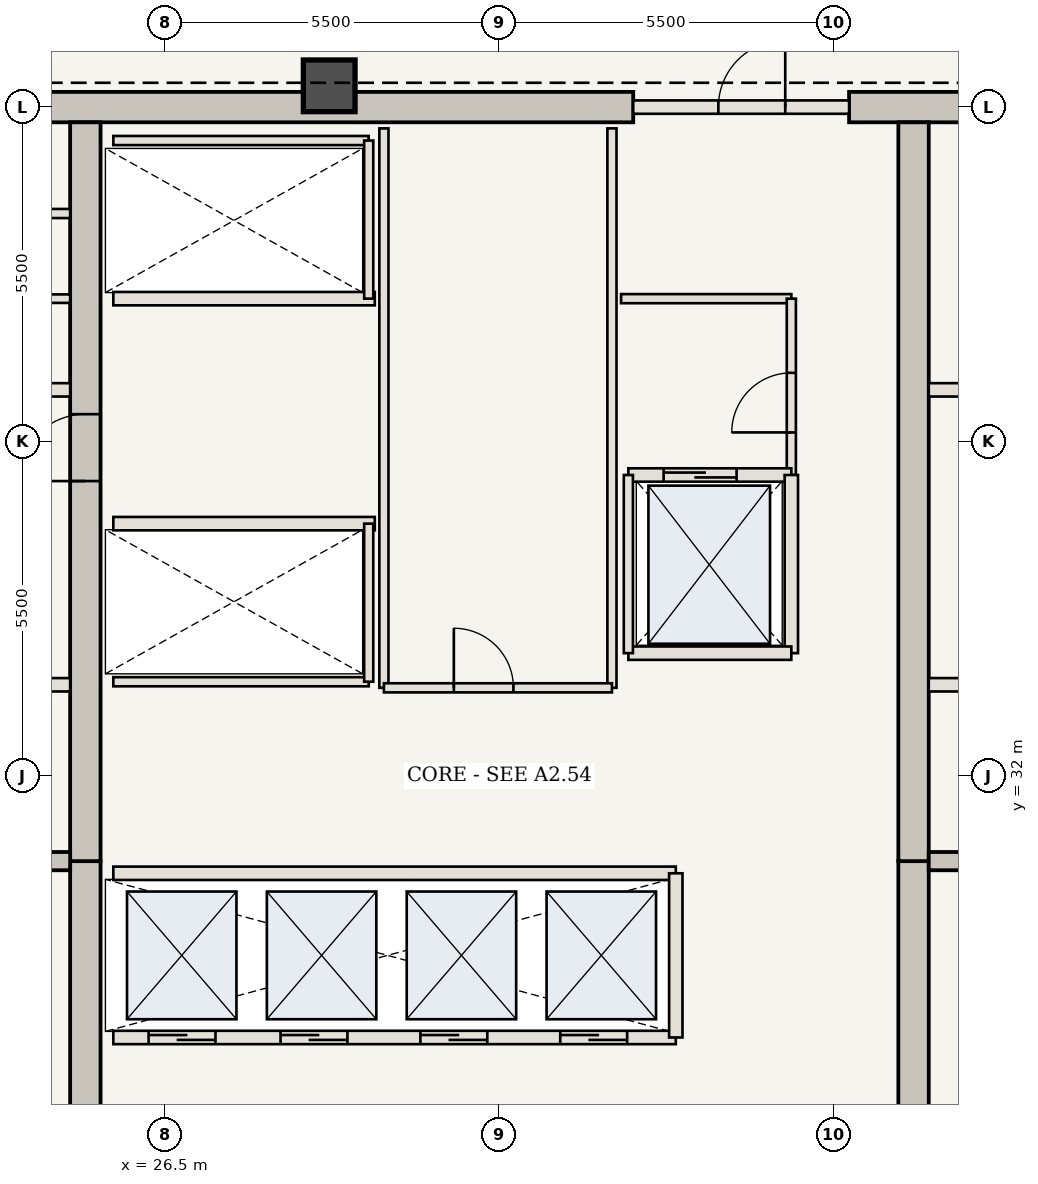
"""IFC4 building model, lengths in metres.
Left out: names, types, materials, properties, quantities, classifications, styles, units other than length and angle.
Written with IfcOpenShell. Run it as: python <this file> out.ifc"""

import sys

from ifc_helpers import new_model, si_unit, direction, frame, frame_2d, origin, origin_2d, place, context, subcontext, project, spatial, rectangle, extrude, element, fill, save


model = new_model("IFC4")
c1 = context("Model", 3, precision=1e-05, world=origin(), true_north=direction((0.0, 1.0)))
c2 = subcontext(c1, "Body", "Model", "MODEL_VIEW")
j1 = project(units=[si_unit("LENGTHUNIT", "METRE"), si_unit("PLANEANGLEUNIT", "RADIAN")], contexts=[c1])
p1 = place(None, origin())
s1 = spatial("IfcSite", under=j1, at=p1, CompositionType="ELEMENT")
p2 = place(p1, origin())
s2 = spatial("IfcBuilding", under=s1, at=p2, CompositionType="ELEMENT")
p3 = place(p2, frame((0.0, 0.0, 244.65)))
s3 = spatial("IfcBuildingStorey", under=s2, at=p3, CompositionType="ELEMENT", Elevation=244.65)
p4 = place(p3, frame((21.41, 43.0, 0.0), z_axis=(0.0, 0.0, 1.0), x_axis=(1.0, 0.0, 0.0)))
e1 = element("IfcWall", 1, at=p4, inside=s3, PredefinedType="SHEAR", context=c2, shape_type="SweptSolid", body=[
    extrude(rectangle(XDim=12.79, YDim=0.5, at=frame_2d((6.395, 0.0))), origin(), (0.0, 0.0, 1.0), 3.85),
])
p5 = place(p3, frame((37.75, 43.0, 0.0), z_axis=(0.0, 0.0, 1.0), x_axis=(1.0, 0.0, 0.0)))
e2 = element("IfcWall", 2, at=p5, inside=s3, PredefinedType="SHEAR", context=c2, shape_type="SweptSolid", body=[
    extrude(rectangle(XDim=4.84, YDim=0.5, at=frame_2d((2.42, 0.0))), origin(), (0.0, 0.0, 1.0), 3.85),
])
p6 = place(p3, frame((25.19, 21.2, 0.0), z_axis=(0.0, 0.0, 1.0), x_axis=(0.0, 1.0, 0.0)))
e3 = element("IfcWall", 3, at=p6, inside=s3, PredefinedType="SHEAR", context=c2, shape_type="SweptSolid", body=[
    extrude(rectangle(XDim=9.4, YDim=0.5, at=frame_2d((4.7, 0.0))), origin(), (0.0, 0.0, 1.0), 3.85),
])
p7 = place(p3, frame((25.19, 30.6, 0.0), z_axis=(0.0, 0.0, 1.0), x_axis=(0.0, 1.0, 0.0)))
e4 = element("IfcWall", 4, at=p7, inside=s3, PredefinedType="SHEAR", context=c2, shape_type="SweptSolid", body=[
    extrude(rectangle(XDim=12.15, YDim=0.5, at=frame_2d((6.075, 0.0))), origin(), (0.0, 0.0, 1.0), 3.85),
])
p8 = place(p7, frame((6.25, 0.0, 0.0)))
e5 = element("IfcOpeningElement", 5, at=p8, cuts=e4, PredefinedType="OPENING", context=c2, shape_type="SweptSolid", body=[
    extrude(rectangle(XDim=1.1, YDim=2.15, at=frame_2d((0.55, 1.075))), frame((0.0, 0.26, 0.0), z_axis=(0.0, -1.0, 0.0), x_axis=(1.0, 0.0, 0.0)), (0.0, 0.0, 1.0), 0.52),
])
p9 = place(p3, frame((38.81, 21.2, 0.0), z_axis=(0.0, 0.0, 1.0), x_axis=(0.0, 1.0, 0.0)))
e6 = element("IfcWall", 6, at=p9, inside=s3, PredefinedType="SHEAR", context=c2, shape_type="SweptSolid", body=[
    extrude(rectangle(XDim=9.4, YDim=0.5, at=frame_2d((4.7, 0.0))), origin(), (0.0, 0.0, 1.0), 3.85),
])
p10 = place(p3, frame((38.81, 30.6, 0.0), z_axis=(0.0, 0.0, 1.0), x_axis=(0.0, 1.0, 0.0)))
e7 = element("IfcWall", 7, at=p10, inside=s3, PredefinedType="SHEAR", context=c2, shape_type="SweptSolid", body=[
    extrude(rectangle(XDim=12.15, YDim=0.5, at=frame_2d((6.075, 0.0))), origin(), (0.0, 0.0, 1.0), 3.85),
])
p11 = place(p3, frame((29.2, 43.35, 0.0), z_axis=(0.0, 0.0, 1.0), x_axis=(1.0, 0.0, 0.0)))
e8 = element("IfcColumn", 8, at=p11, inside=s3, PredefinedType="COLUMN", context=c2, shape_type="SweptSolid", body=[
    extrude(rectangle(XDim=0.85, YDim=0.85, at=origin_2d()), origin(), (0.0, 0.0, 1.0), 3.85),
])
for number, where, z_axis, x_axis in (
    (9, (21.41, 30.6, 0.0), (0.0, 0.0, 1.0), (1.0, 0.0, 0.0)),
    (10, (39.06, 30.6, 0.0), (0.0, 0.0, 1.0), (1.0, 0.0, 0.0)),
):
    element("IfcWall", number, at=place(p3, frame(where, z_axis=z_axis, x_axis=x_axis)), inside=s3, PredefinedType="SHEAR", context=c2, shape_type="SweptSolid", body=[
        extrude(rectangle(XDim=3.53, YDim=0.3, at=frame_2d((1.765, 0.0))), origin(), (0.0, 0.0, 1.0), 3.685),
    ])
p12 = place(p3, frame((21.41, 33.5, 0.0), z_axis=(0.0, 0.0, 1.0), x_axis=(1.0, 0.0, 0.0)))
e11 = element("IfcWall", 11, at=p12, inside=s3, PredefinedType="STANDARD", context=c2, shape_type="SweptSolid", body=[
    extrude(rectangle(XDim=3.53, YDim=0.22, at=frame_2d((1.765, 0.0))), origin(), (0.0, 0.0, 1.0), 3.685),
])
p13 = place(p12, frame((0.75, 0.0, 0.0)))
e12 = element("IfcOpeningElement", 12, at=p13, cuts=e11, PredefinedType="OPENING", context=c2, shape_type="SweptSolid", body=[
    extrude(rectangle(XDim=1.2, YDim=2.2, at=frame_2d((0.6, 1.1))), frame((0.0, 0.12, 0.0), z_axis=(0.0, -1.0, 0.0), x_axis=(1.0, 0.0, 0.0)), (0.0, 0.0, 1.0), 0.24),
])
p14 = place(p3, frame((39.06, 33.5, 0.0), z_axis=(0.0, 0.0, 1.0), x_axis=(1.0, 0.0, 0.0)))
e13 = element("IfcWall", 13, at=p14, inside=s3, PredefinedType="STANDARD", context=c2, shape_type="SweptSolid", body=[
    extrude(rectangle(XDim=3.53, YDim=0.22, at=frame_2d((1.765, 0.0))), origin(), (0.0, 0.0, 1.0), 3.685),
])
p15 = place(p14, frame((1.55, 0.0, 0.0)))
e14 = element("IfcOpeningElement", 14, at=p15, cuts=e13, PredefinedType="OPENING", context=c2, shape_type="SweptSolid", body=[
    extrude(rectangle(XDim=1.2, YDim=2.2, at=frame_2d((0.6, 1.1))), frame((0.0, 0.12, 0.0), z_axis=(0.0, -1.0, 0.0), x_axis=(1.0, 0.0, 0.0)), (0.0, 0.0, 1.0), 0.24),
])
for number, where, z_axis, x_axis in (
    (15, (21.41, 38.35, 0.0), (0.0, 0.0, 1.0), (1.0, 0.0, 0.0)),
    (16, (39.06, 38.35, 0.0), (0.0, 0.0, 1.0), (1.0, 0.0, 0.0)),
):
    element("IfcWall", number, at=place(p3, frame(where, z_axis=z_axis, x_axis=x_axis)), inside=s3, PredefinedType="STANDARD", context=c2, shape_type="SweptSolid", body=[
        extrude(rectangle(XDim=3.53, YDim=0.22, at=frame_2d((1.765, 0.0))), origin(), (0.0, 0.0, 1.0), 3.685),
    ])
p16 = place(p3, frame((21.41, 39.85, 0.0), z_axis=(0.0, 0.0, 1.0), x_axis=(1.0, 0.0, 0.0)))
e17 = element("IfcWall", 17, at=p16, inside=s3, PredefinedType="STANDARD", context=c2, shape_type="SweptSolid", body=[
    extrude(rectangle(XDim=3.53, YDim=0.14, at=frame_2d((1.765, 0.0))), origin(), (0.0, 0.0, 1.0), 3.685),
])
p17 = place(p3, frame((21.41, 41.25, 0.0), z_axis=(0.0, 0.0, 1.0), x_axis=(1.0, 0.0, 0.0)))
e18 = element("IfcWall", 18, at=p17, inside=s3, PredefinedType="STANDARD", context=c2, shape_type="SweptSolid", body=[
    extrude(rectangle(XDim=3.53, YDim=0.15, at=frame_2d((1.765, 0.0))), origin(), (0.0, 0.0, 1.0), 3.685),
])
p18 = place(p3, frame((34.0, 39.85, 0.0), z_axis=(0.0, 0.0, 1.0), x_axis=(1.0, 0.0, 0.0)))
e19 = element("IfcWall", 19, at=p18, inside=s3, PredefinedType="STANDARD", context=c2, shape_type="SweptSolid", body=[
    extrude(rectangle(XDim=2.8, YDim=0.15, at=frame_2d((1.4, 0.0))), origin(), (0.0, 0.0, 1.0), 3.685),
])
p19 = place(p3, frame((36.8, 36.95, 0.0), z_axis=(0.0, 0.0, 1.0), x_axis=(0.0, 1.0, 0.0)))
e20 = element("IfcWall", 20, at=p19, inside=s3, PredefinedType="STANDARD", context=c2, shape_type="SweptSolid", body=[
    extrude(rectangle(XDim=2.9, YDim=0.15, at=frame_2d((1.45, 0.0))), origin(), (0.0, 0.0, 1.0), 3.685),
])
p20 = place(p19, frame((0.7, 0.0, 0.0)))
e21 = element("IfcOpeningElement", 21, at=p20, cuts=e20, PredefinedType="OPENING", context=c2, shape_type="SweptSolid", body=[
    extrude(rectangle(XDim=0.98, YDim=2.2, at=frame_2d((0.49, 1.1))), frame((0.0, 0.085, 0.0), z_axis=(0.0, -1.0, 0.0), x_axis=(1.0, 0.0, 0.0)), (0.0, 0.0, 1.0), 0.17),
])
p21 = place(p3, frame((25.65, 27.7, 0.0), z_axis=(0.0, 0.0, 1.0), x_axis=(1.0, 0.0, 0.0)))
e22 = element("IfcWall", 22, at=p21, inside=s3, PredefinedType="STANDARD", context=c2, shape_type="SweptSolid", body=[
    extrude(rectangle(XDim=9.25, YDim=0.22, at=frame_2d((4.625, 0.0))), origin(), (0.0, 0.0, 1.0), 3.685),
])
p22 = place(p21, frame((0.58, 0.0, 0.0)))
e23 = element("IfcOpeningElement", 23, at=p22, cuts=e22, PredefinedType="OPENING", context=c2, shape_type="SweptSolid", body=[
    extrude(rectangle(XDim=1.1, YDim=2.15, at=frame_2d((0.55, 1.075))), frame((0.0, 0.12, 0.0), z_axis=(0.0, -1.0, 0.0), x_axis=(1.0, 0.0, 0.0)), (0.0, 0.0, 1.0), 0.24),
])
p23 = place(p21, frame((2.75, 0.0, 0.0)))
e24 = element("IfcOpeningElement", 24, at=p23, cuts=e22, PredefinedType="OPENING", context=c2, shape_type="SweptSolid", body=[
    extrude(rectangle(XDim=1.1, YDim=2.15, at=frame_2d((0.55, 1.075))), frame((0.0, 0.12, 0.0), z_axis=(0.0, -1.0, 0.0), x_axis=(1.0, 0.0, 0.0)), (0.0, 0.0, 1.0), 0.24),
])
p24 = place(p21, frame((5.05, 0.0, 0.0)))
e25 = element("IfcOpeningElement", 25, at=p24, cuts=e22, PredefinedType="OPENING", context=c2, shape_type="SweptSolid", body=[
    extrude(rectangle(XDim=1.1, YDim=2.15, at=frame_2d((0.55, 1.075))), frame((0.0, 0.12, 0.0), z_axis=(0.0, -1.0, 0.0), x_axis=(1.0, 0.0, 0.0)), (0.0, 0.0, 1.0), 0.24),
])
p25 = place(p21, frame((7.35, 0.0, 0.0)))
e26 = element("IfcOpeningElement", 26, at=p25, cuts=e22, PredefinedType="OPENING", context=c2, shape_type="SweptSolid", body=[
    extrude(rectangle(XDim=1.1, YDim=2.15, at=frame_2d((0.55, 1.075))), frame((0.0, 0.12, 0.0), z_axis=(0.0, -1.0, 0.0), x_axis=(1.0, 0.0, 0.0)), (0.0, 0.0, 1.0), 0.24),
])
p26 = place(p3, frame((25.65, 30.4, 0.0), z_axis=(0.0, 0.0, 1.0), x_axis=(1.0, 0.0, 0.0)))
e27 = element("IfcWall", 27, at=p26, inside=s3, PredefinedType="STANDARD", context=c2, shape_type="SweptSolid", body=[
    extrude(rectangle(XDim=9.25, YDim=0.22, at=frame_2d((4.625, 0.0))), origin(), (0.0, 0.0, 1.0), 3.685),
])
p27 = place(p3, frame((34.9, 27.7, 0.0), z_axis=(0.0, 0.0, 1.0), x_axis=(0.0, 1.0, 0.0)))
e28 = element("IfcWall", 28, at=p27, inside=s3, PredefinedType="STANDARD", context=c2, shape_type="SweptSolid", body=[
    extrude(rectangle(XDim=2.7, YDim=0.22, at=frame_2d((1.35, 0.0))), origin(), (0.0, 0.0, 1.0), 3.685),
])
p28 = place(p3, frame((25.65, 36.15, 0.0), z_axis=(0.0, 0.0, 1.0), x_axis=(1.0, 0.0, 0.0)))
e29 = element("IfcWall", 29, at=p28, inside=s3, PredefinedType="STANDARD", context=c2, shape_type="SweptSolid", body=[
    extrude(rectangle(XDim=4.3, YDim=0.22, at=frame_2d((2.15, 0.0))), origin(), (0.0, 0.0, 1.0), 3.685),
])
p29 = place(p3, frame((25.65, 33.55, 0.0), z_axis=(0.0, 0.0, 1.0), x_axis=(1.0, 0.0, 0.0)))
e30 = element("IfcWall", 30, at=p29, inside=s3, PredefinedType="STANDARD", context=c2, shape_type="SweptSolid", body=[
    extrude(rectangle(XDim=4.2, YDim=0.15, at=frame_2d((2.1, 0.0))), origin(), (0.0, 0.0, 1.0), 3.685),
])
p30 = place(p3, frame((29.85, 33.55, 0.0), z_axis=(0.0, 0.0, 1.0), x_axis=(0.0, 1.0, 0.0)))
e31 = element("IfcWall", 31, at=p30, inside=s3, PredefinedType="STANDARD", context=c2, shape_type="SweptSolid", body=[
    extrude(rectangle(XDim=2.6, YDim=0.15, at=frame_2d((1.3, 0.0))), origin(), (0.0, 0.0, 1.0), 3.685),
])
p31 = place(p3, frame((25.65, 39.85, 0.0), z_axis=(0.0, 0.0, 1.0), x_axis=(1.0, 0.0, 0.0)))
e32 = element("IfcWall", 32, at=p31, inside=s3, PredefinedType="STANDARD", context=c2, shape_type="SweptSolid", body=[
    extrude(rectangle(XDim=4.3, YDim=0.22, at=frame_2d((2.15, 0.0))), origin(), (0.0, 0.0, 1.0), 3.685),
])
p32 = place(p3, frame((25.65, 42.45, 0.0), z_axis=(0.0, 0.0, 1.0), x_axis=(1.0, 0.0, 0.0)))
e33 = element("IfcWall", 33, at=p32, inside=s3, PredefinedType="STANDARD", context=c2, shape_type="SweptSolid", body=[
    extrude(rectangle(XDim=4.2, YDim=0.15, at=frame_2d((2.1, 0.0))), origin(), (0.0, 0.0, 1.0), 3.685),
])
p33 = place(p3, frame((29.85, 39.85, 0.0), z_axis=(0.0, 0.0, 1.0), x_axis=(0.0, 1.0, 0.0)))
e34 = element("IfcWall", 34, at=p33, inside=s3, PredefinedType="STANDARD", context=c2, shape_type="SweptSolid", body=[
    extrude(rectangle(XDim=2.6, YDim=0.15, at=frame_2d((1.3, 0.0))), origin(), (0.0, 0.0, 1.0), 3.685),
])
for number, where, z_axis, x_axis in (
    (35, (30.1, 33.45, 0.0), (0.0, 0.0, 1.0), (0.0, 1.0, 0.0)),
    (36, (33.85, 33.45, 0.0), (0.0, 0.0, 1.0), (0.0, 1.0, 0.0)),
):
    element("IfcWall", number, at=place(p3, frame(where, z_axis=z_axis, x_axis=x_axis)), inside=s3, PredefinedType="STANDARD", context=c2, shape_type="SweptSolid", body=[
        extrude(rectangle(XDim=9.2, YDim=0.15, at=frame_2d((4.6, 0.0))), origin(), (0.0, 0.0, 1.0), 3.685),
    ])
p34 = place(p3, frame((30.1, 33.45, 0.0), z_axis=(0.0, 0.0, 1.0), x_axis=(1.0, 0.0, 0.0)))
e37 = element("IfcWall", 37, at=p34, inside=s3, PredefinedType="STANDARD", context=c2, shape_type="SweptSolid", body=[
    extrude(rectangle(XDim=3.75, YDim=0.15, at=frame_2d((1.875, 0.0))), origin(), (0.0, 0.0, 1.0), 3.685),
])
p35 = place(p34, frame((1.15, 0.0, 0.0)))
e38 = element("IfcOpeningElement", 38, at=p35, cuts=e37, PredefinedType="OPENING", context=c2, shape_type="SweptSolid", body=[
    extrude(rectangle(XDim=0.98, YDim=2.2, at=frame_2d((0.49, 1.1))), frame((0.0, 0.085, 0.0), z_axis=(0.0, -1.0, 0.0), x_axis=(1.0, 0.0, 0.0)), (0.0, 0.0, 1.0), 0.17),
])
p36 = place(p3, frame((34.2, 43.0, 0.0), z_axis=(0.0, 0.0, 1.0), x_axis=(1.0, 0.0, 0.0)))
e39 = element("IfcWall", 39, at=p36, inside=s3, PredefinedType="STANDARD", context=c2, shape_type="SweptSolid", body=[
    extrude(rectangle(XDim=3.55, YDim=0.22, at=frame_2d((1.775, 0.0))), origin(), (0.0, 0.0, 1.0), 3.685),
])
p37 = place(p36, frame((1.4, 0.0, 0.0)))
e40 = element("IfcOpeningElement", 40, at=p37, cuts=e39, PredefinedType="OPENING", context=c2, shape_type="SweptSolid", body=[
    extrude(rectangle(XDim=1.1, YDim=2.15, at=frame_2d((0.55, 1.075))), frame((0.0, 0.12, 0.0), z_axis=(0.0, -1.0, 0.0), x_axis=(1.0, 0.0, 0.0)), (0.0, 0.0, 1.0), 0.24),
])
p38 = place(p3, frame((34.12, 36.95, 0.0), z_axis=(0.0, 0.0, 1.0), x_axis=(1.0, 0.0, 0.0)))
e41 = element("IfcWall", 41, at=p38, inside=s3, PredefinedType="STANDARD", context=c2, shape_type="SweptSolid", body=[
    extrude(rectangle(XDim=2.68, YDim=0.22, at=frame_2d((1.34, 0.0))), origin(), (0.0, 0.0, 1.0), 3.685),
])
p39 = place(p38, frame((0.58, 0.0, 0.0)))
e42 = element("IfcOpeningElement", 42, at=p39, cuts=e41, PredefinedType="OPENING", context=c2, shape_type="SweptSolid", body=[
    extrude(rectangle(XDim=1.2, YDim=2.2, at=frame_2d((0.6, 1.1))), frame((0.0, 0.12, 0.0), z_axis=(0.0, -1.0, 0.0), x_axis=(1.0, 0.0, 0.0)), (0.0, 0.0, 1.0), 0.24),
])
p40 = place(p3, frame((36.8, 34.02, 0.0), z_axis=(0.0, 0.0, 1.0), x_axis=(0.0, 1.0, 0.0)))
e43 = element("IfcWall", 43, at=p40, inside=s3, PredefinedType="STANDARD", context=c2, shape_type="SweptSolid", body=[
    extrude(rectangle(XDim=2.93, YDim=0.22, at=frame_2d((1.465, 0.0))), origin(), (0.0, 0.0, 1.0), 3.685),
])
p41 = place(p3, frame((34.12, 34.02, 0.0), z_axis=(0.0, 0.0, 1.0), x_axis=(1.0, 0.0, 0.0)))
e44 = element("IfcWall", 44, at=p41, inside=s3, PredefinedType="STANDARD", context=c2, shape_type="SweptSolid", body=[
    extrude(rectangle(XDim=2.68, YDim=0.22, at=frame_2d((1.34, 0.0))), origin(), (0.0, 0.0, 1.0), 3.685),
])
p42 = place(p3, frame((34.12, 34.02, 0.0), z_axis=(0.0, 0.0, 1.0), x_axis=(0.0, 1.0, 0.0)))
e45 = element("IfcWall", 45, at=p42, inside=s3, PredefinedType="STANDARD", context=c2, shape_type="SweptSolid", body=[
    extrude(rectangle(XDim=2.93, YDim=0.15, at=frame_2d((1.465, 0.0))), origin(), (0.0, 0.0, 1.0), 3.685),
])
p43 = place(p8, origin())
e46 = element("IfcDoor", 46, at=p43, inside=s3, OperationType="SINGLE_SWING_LEFT", PredefinedType="DOOR", context=c2, shape_type="SweptSolid", body=[
    extrude(rectangle(XDim=1.1, YDim=2.15, at=frame_2d((0.55, 1.075))), frame((0.0, 0.025, 0.0), z_axis=(0.0, -1.0, 0.0), x_axis=(1.0, 0.0, 0.0)), (0.0, 0.0, 1.0), 0.05),
])
fill(e5, e46)
p44 = place(p20, origin())
e47 = element("IfcDoor", 47, at=p44, inside=s3, OperationType="SINGLE_SWING_LEFT", PredefinedType="DOOR", context=c2, shape_type="SweptSolid", body=[
    extrude(rectangle(XDim=0.98, YDim=2.2, at=frame_2d((0.49, 1.1))), frame((0.0, 0.025, 0.0), z_axis=(0.0, -1.0, 0.0), x_axis=(1.0, 0.0, 0.0)), (0.0, 0.0, 1.0), 0.05),
])
fill(e21, e47)
p45 = place(p22, origin())
e48 = element("IfcDoor", 48, at=p45, inside=s3, OperationType="DOUBLE_DOOR_SLIDING", PredefinedType="DOOR", context=c2, shape_type="SweptSolid", body=[
    extrude(rectangle(XDim=1.1, YDim=2.15, at=frame_2d((0.55, 1.075))), frame((0.0, 0.025, 0.0), z_axis=(0.0, -1.0, 0.0), x_axis=(1.0, 0.0, 0.0)), (0.0, 0.0, 1.0), 0.05),
])
fill(e23, e48)
p46 = place(p23, origin())
e49 = element("IfcDoor", 49, at=p46, inside=s3, OperationType="DOUBLE_DOOR_SLIDING", PredefinedType="DOOR", context=c2, shape_type="SweptSolid", body=[
    extrude(rectangle(XDim=1.1, YDim=2.15, at=frame_2d((0.55, 1.075))), frame((0.0, 0.025, 0.0), z_axis=(0.0, -1.0, 0.0), x_axis=(1.0, 0.0, 0.0)), (0.0, 0.0, 1.0), 0.05),
])
fill(e24, e49)
p47 = place(p24, origin())
e50 = element("IfcDoor", 50, at=p47, inside=s3, OperationType="DOUBLE_DOOR_SLIDING", PredefinedType="DOOR", context=c2, shape_type="SweptSolid", body=[
    extrude(rectangle(XDim=1.1, YDim=2.15, at=frame_2d((0.55, 1.075))), frame((0.0, 0.025, 0.0), z_axis=(0.0, -1.0, 0.0), x_axis=(1.0, 0.0, 0.0)), (0.0, 0.0, 1.0), 0.05),
])
fill(e25, e50)
p48 = place(p25, origin())
e51 = element("IfcDoor", 51, at=p48, inside=s3, OperationType="DOUBLE_DOOR_SLIDING", PredefinedType="DOOR", context=c2, shape_type="SweptSolid", body=[
    extrude(rectangle(XDim=1.1, YDim=2.15, at=frame_2d((0.55, 1.075))), frame((0.0, 0.025, 0.0), z_axis=(0.0, -1.0, 0.0), x_axis=(1.0, 0.0, 0.0)), (0.0, 0.0, 1.0), 0.05),
])
fill(e26, e51)
p49 = place(p35, origin())
e52 = element("IfcDoor", 52, at=p49, inside=s3, OperationType="SINGLE_SWING_LEFT", PredefinedType="DOOR", context=c2, shape_type="SweptSolid", body=[
    extrude(rectangle(XDim=0.98, YDim=2.2, at=frame_2d((0.49, 1.1))), frame((0.0, 0.025, 0.0), z_axis=(0.0, -1.0, 0.0), x_axis=(1.0, 0.0, 0.0)), (0.0, 0.0, 1.0), 0.05),
])
fill(e38, e52)
p50 = place(p37, origin())
e53 = element("IfcDoor", 53, at=p50, inside=s3, OperationType="SINGLE_SWING_RIGHT", PredefinedType="DOOR", context=c2, shape_type="SweptSolid", body=[
    extrude(rectangle(XDim=1.1, YDim=2.15, at=frame_2d((0.55, 1.075))), frame((0.0, 0.025, 0.0), z_axis=(0.0, -1.0, 0.0), x_axis=(1.0, 0.0, 0.0)), (0.0, 0.0, 1.0), 0.05),
])
fill(e40, e53)
p51 = place(p39, origin())
e54 = element("IfcDoor", 54, at=p51, inside=s3, OperationType="DOUBLE_DOOR_SLIDING", PredefinedType="DOOR", context=c2, shape_type="SweptSolid", body=[
    extrude(rectangle(XDim=1.2, YDim=2.2, at=frame_2d((0.6, 1.1))), frame((0.0, 0.025, 0.0), z_axis=(0.0, -1.0, 0.0), x_axis=(1.0, 0.0, 0.0)), (0.0, 0.0, 1.0), 0.05),
])
fill(e42, e54)
save(model, sys.argv[1])
